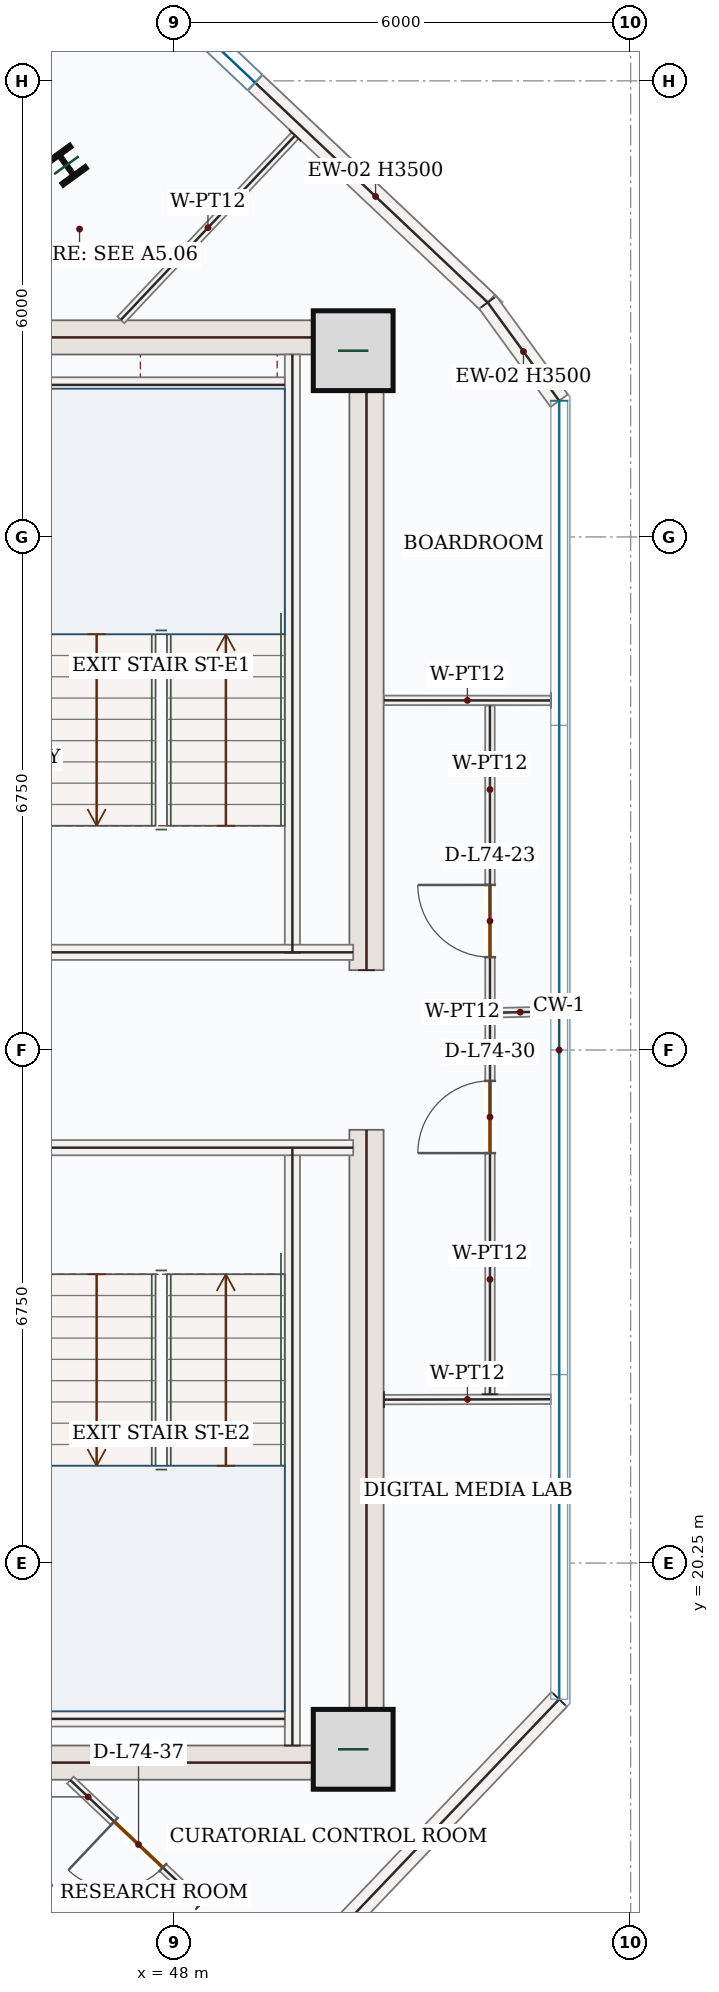
"""IFC4 building model, lengths in metres.
Left out: names, types, materials, properties, quantities, classifications, styles, units other than length and angle.
Written with IfcOpenShell. Run it as: python <this file> out.ifc"""

import sys

from ifc_helpers import new_model, si_unit, direction, frame, frame_2d, origin, origin_2d, place, context, subcontext, project, spatial, rectangle, i_section, extrude, source, transform, mapped, element, fill, save


model = new_model("IFC4")
c1 = context("Model", 3, precision=1e-05, world=origin(), true_north=direction((0.0, 1.0)))
c2 = subcontext(c1, "Body", "Model", "MODEL_VIEW")
j1 = project(units=[si_unit("LENGTHUNIT", "METRE"), si_unit("PLANEANGLEUNIT", "RADIAN")], contexts=[c1])
p1 = place(None, origin())
s1 = spatial("IfcSite", under=j1, at=p1, CompositionType="ELEMENT")
p2 = place(p1, origin())
s2 = spatial("IfcBuilding", under=s1, at=p2, CompositionType="ELEMENT")
p3 = place(p2, frame((0.0, 0.0, 306.6)))
s3 = spatial("IfcBuildingStorey", under=s2, at=p3, CompositionType="ELEMENT", Elevation=306.6)
m1 = source(origin(), c2, "Body", "SweptSolid", [
    extrude(rectangle(XDim=8.55, YDim=0.45, at=frame_2d((4.275, 0.0))), origin(), (0.0, 0.0, 1.0), 3.5),
])
for number, where, z_axis, x_axis in (
    (1, (50.525, 17.4, 0.0), (0.0, 0.0, 1.0), (0.0, 1.0, 0.0)),
    (2, (50.525, 28.05, 0.0), (0.0, 0.0, 1.0), (0.0, 1.0, 0.0)),
):
    element("IfcWall", number, at=place(p3, frame(where, z_axis=z_axis, x_axis=x_axis)), inside=s3, PredefinedType="SHEAR", context=c2, shape_type="MappedRepresentation", body=[
        mapped(m1, transform((0.0, 0.0, 0.0), x_axis=(1.0, 0.0, 0.0), y_axis=(0.0, 1.0, 0.0), z_axis=(0.0, 0.0, 1.0), scale=1.0)),
    ])
m2 = source(origin(), c2, "Body", "SweptSolid", [
    extrude(rectangle(XDim=7.1, YDim=0.45, at=frame_2d((3.55, 0.0))), origin(), (0.0, 0.0, 1.0), 3.5),
])
for number, where, z_axis, x_axis in (
    (3, (43.2, 17.625, 0.0), (0.0, 0.0, 1.0), (1.0, 0.0, 0.0)),
    (4, (43.2, 36.375, 0.0), (0.0, 0.0, 1.0), (1.0, 0.0, 0.0)),
):
    element("IfcWall", number, at=place(p3, frame(where, z_axis=z_axis, x_axis=x_axis)), inside=s3, PredefinedType="SHEAR", context=c2, shape_type="MappedRepresentation", body=[
        mapped(m2, transform((0.0, 0.0, 0.0), x_axis=(1.0, 0.0, 0.0), y_axis=(0.0, 1.0, 0.0), z_axis=(0.0, 0.0, 1.0), scale=1.0)),
    ])
m3 = source(origin(), c2, "Body", "SweptSolid", [
    extrude(rectangle(XDim=1.05, YDim=1.05, at=origin_2d()), origin(), (0.0, 0.0, 1.0), 3.75),
])
for number, where, z_axis, x_axis in (
    (5, (50.35, 17.8, 0.0), (0.0, 0.0, 1.0), (1.0, 0.0, 0.0)),
    (6, (50.35, 36.2, 0.0), (0.0, 0.0, 1.0), (1.0, 0.0, 0.0)),
):
    element("IfcColumn", number, at=place(p3, frame(where, z_axis=z_axis, x_axis=x_axis)), inside=s3, PredefinedType="COLUMN", context=c2, shape_type="MappedRepresentation", body=[
        mapped(m3, transform((0.0, 0.0, 0.0), x_axis=(1.0, 0.0, 0.0), y_axis=(0.0, 1.0, 0.0), z_axis=(0.0, 0.0, 1.0), scale=1.0)),
    ])
m4 = source(origin(), c2, "Body", "SweptSolid", [
    extrude(i_section(OverallWidth=0.374, OverallDepth=0.372, WebThickness=0.016, FlangeThickness=0.026, FilletRadius=0.018, at=origin_2d()), origin(), (0.0, 0.0, 1.0), 3.75),
])
p4 = place(p3, frame((46.578, 38.641, 0.0), z_axis=(0.0, 0.0, 1.0), x_axis=(0.809016994375, 0.587785252292, 0.0)))
e7 = element("IfcColumn", 7, at=p4, inside=s3, PredefinedType="COLUMN", context=c2, shape_type="MappedRepresentation", body=[
    mapped(m4, transform((0.0, 0.0, 0.0), x_axis=(1.0, 0.0, 0.0), y_axis=(0.0, 1.0, 0.0), z_axis=(0.0, 0.0, 1.0), scale=1.0)),
])
p5 = place(p3, frame((44.91, 43.649, 0.0), z_axis=(0.0, 0.0, 1.0), x_axis=(0.726772856404, -0.686877875022, 0.0)))
e8 = element("IfcWall", 8, at=p5, inside=s3, PredefinedType="SOLIDWALL", context=c2, shape_type="SweptSolid", body=[
    extrude(rectangle(XDim=9.92, YDim=0.28, at=frame_2d((4.96, 0.0))), origin(), (0.0, 0.0, 1.0), 3.5),
])
p6 = place(p5, frame((4.21, 0.0, 0.85)))
e9 = element("IfcOpeningElement", 9, at=p6, cuts=e8, PredefinedType="OPENING", context=c2, shape_type="SweptSolid", body=[
    extrude(rectangle(XDim=1.5, YDim=1.5, at=frame_2d((0.75, 0.75))), frame((0.0, 0.15, 0.0), z_axis=(0.0, -1.0, 0.0), x_axis=(1.0, 0.0, 0.0)), (0.0, 0.0, 1.0), 0.3),
])
m5 = source(origin(), c2, "Body", "SweptSolid", [
    extrude(rectangle(XDim=1.599, YDim=0.28, at=frame_2d((0.799, 0.0))), origin(), (0.0, 0.0, 1.0), 3.5),
])
p7 = place(p3, frame((52.12, 36.835, 0.0), z_axis=(0.0, 0.0, 1.0), x_axis=(0.58820801539, -0.808709670173, 0.0)))
e10 = element("IfcWall", 10, at=p7, inside=s3, PredefinedType="SOLIDWALL", context=c2, shape_type="MappedRepresentation", body=[
    mapped(m5, transform((0.0, 0.0, 0.0), x_axis=(1.0, 0.0, 0.0), y_axis=(0.0, 1.0, 0.0), z_axis=(0.0, 0.0, 1.0), scale=1.0)),
])
m6 = source(origin(), c2, "Body", "SweptSolid", [
    extrude(rectangle(XDim=10.47, YDim=0.28, at=frame_2d((5.235, 0.0))), origin(), (0.0, 0.0, 1.0), 3.5),
])
p8 = place(p3, frame((53.06, 18.458, 0.0), z_axis=(0.0, 0.0, 1.0), x_axis=(-0.690070788875, -0.723741878256, 0.0)))
e11 = element("IfcWall", 11, at=p8, inside=s3, PredefinedType="SOLIDWALL", context=c2, shape_type="MappedRepresentation", body=[
    mapped(m6, transform((0.0, 0.0, 0.0), x_axis=(1.0, 0.0, 0.0), y_axis=(0.0, 1.0, 0.0), z_axis=(0.0, 0.0, 1.0), scale=1.0)),
])
m7 = source(origin(), c2, "Body", "SweptSolid", [
    extrude(rectangle(XDim=7.87, YDim=0.2, at=frame_2d((3.935, 0.0))), origin(), (0.0, 0.0, 1.0), 3.5),
])
for number, where, z_axis, x_axis in (
    (12, (49.55, 17.85, 0.0), (0.0, 0.0, 1.0), (0.0, 1.0, 0.0)),
    (13, (49.55, 28.28, 0.0), (0.0, 0.0, 1.0), (0.0, 1.0, 0.0)),
):
    element("IfcWall", number, at=place(p3, frame(where, z_axis=z_axis, x_axis=x_axis)), inside=s3, PredefinedType="SOLIDWALL", context=c2, shape_type="MappedRepresentation", body=[
        mapped(m7, transform((0.0, 0.0, 0.0), x_axis=(1.0, 0.0, 0.0), y_axis=(0.0, 1.0, 0.0), z_axis=(0.0, 0.0, 1.0), scale=1.0)),
    ])
m8 = source(origin(), c2, "Body", "SweptSolid", [
    extrude(rectangle(XDim=4.25, YDim=0.2, at=frame_2d((2.125, 0.0))), origin(), (0.0, 0.0, 1.0), 3.5),
])
for number, where, z_axis, x_axis in (
    (14, (46.1, 25.715, 0.0), (0.0, 0.0, 1.0), (1.0, 0.0, 0.0)),
    (15, (46.1, 28.285, 0.0), (0.0, 0.0, 1.0), (1.0, 0.0, 0.0)),
):
    element("IfcWall", number, at=place(p3, frame(where, z_axis=z_axis, x_axis=x_axis)), inside=s3, PredefinedType="SOLIDWALL", context=c2, shape_type="MappedRepresentation", body=[
        mapped(m8, transform((0.0, 0.0, 0.0), x_axis=(1.0, 0.0, 0.0), y_axis=(0.0, 1.0, 0.0), z_axis=(0.0, 0.0, 1.0), scale=1.0)),
    ])
m9 = source(origin(), c2, "Body", "SweptSolid", [
    extrude(rectangle(XDim=3.25, YDim=0.2, at=frame_2d((1.625, 0.0))), origin(), (0.0, 0.0, 1.0), 3.5),
])
for number, where, z_axis, x_axis in (
    (16, (46.2, 35.75, 0.0), (0.0, 0.0, 1.0), (1.0, 0.0, 0.0)),
    (17, (46.2, 18.2, 0.0), (0.0, 0.0, 1.0), (1.0, 0.0, 0.0)),
):
    element("IfcWall", number, at=place(p3, frame(where, z_axis=z_axis, x_axis=x_axis)), inside=s3, PredefinedType="SOLIDWALL", context=c2, shape_type="MappedRepresentation", body=[
        mapped(m9, transform((0.0, 0.0, 0.0), x_axis=(1.0, 0.0, 0.0), y_axis=(0.0, 1.0, 0.0), z_axis=(0.0, 0.0, 1.0), scale=1.0)),
    ])
p9 = place(p3, frame((48.349, 15.769, 0.0), z_axis=(0.0, 0.0, 1.0), x_axis=(-0.726735597886, 0.686917295433, 0.0)))
e18 = element("IfcWall", 18, at=p9, inside=s3, PredefinedType="PARTITIONING", context=c2, shape_type="SweptSolid", body=[
    extrude(rectangle(XDim=2.367, YDim=0.125, at=frame_2d((1.183, 0.0))), origin(), (0.0, 0.0, 1.0), 3.5),
])
p10 = place(p9, frame((0.692, 0.0, 0.0)))
e19 = element("IfcOpeningElement", 19, at=p10, cuts=e18, PredefinedType="OPENING", context=c2, shape_type="SweptSolid", body=[
    extrude(rectangle(XDim=0.88, YDim=2.1, at=frame_2d((0.44, 1.05))), frame((0.0, 0.073, 0.0), z_axis=(0.0, -1.0, 0.0), x_axis=(1.0, 0.0, 0.0)), (0.0, 0.0, 1.0), 0.145),
])
p11 = place(p3, frame((47.544, 12.883, 0.0), z_axis=(0.0, 0.0, 1.0), x_axis=(-0.726761082497, 0.686890332562, 0.0)))
e20 = element("IfcWall", 20, at=p11, inside=s3, PredefinedType="PARTITIONING", context=c2, shape_type="SweptSolid", body=[
    extrude(rectangle(XDim=5.964, YDim=0.125, at=frame_2d((2.982, 0.0))), origin(), (0.0, 0.0, 1.0), 3.5),
])
p12 = place(p11, frame((1.103, 0.0, 0.0)))
e21 = element("IfcOpeningElement", 21, at=p12, cuts=e20, PredefinedType="OPENING", context=c2, shape_type="SweptSolid", body=[
    extrude(rectangle(XDim=0.95, YDim=2.15, at=frame_2d((0.475, 1.075))), frame((0.0, 0.073, 0.0), z_axis=(0.0, -1.0, 0.0), x_axis=(1.0, 0.0, 0.0)), (0.0, 0.0, 1.0), 0.145),
])
m10 = source(origin(), c2, "Body", "SweptSolid", [
    extrude(rectangle(XDim=2.195, YDim=0.125, at=frame_2d((1.098, 0.0))), origin(), (0.0, 0.0, 1.0), 3.5),
])
p13 = place(p3, frame((50.755, 22.4, 0.0), z_axis=(0.0, 0.0, 1.0), x_axis=(0.999997006375, 0.002446884011, 0.0)))
e22 = element("IfcWall", 22, at=p13, inside=s3, PredefinedType="PARTITIONING", context=c2, shape_type="MappedRepresentation", body=[
    mapped(m10, transform((0.0, 0.0, 0.0), x_axis=(1.0, 0.0, 0.0), y_axis=(0.0, 1.0, 0.0), z_axis=(0.0, 0.0, 1.0), scale=1.0)),
])
p14 = place(p3, frame((52.149, 22.471, 0.0), z_axis=(0.0, 0.0, 1.0), x_axis=(9.7318865e-05, 0.999999995265, 0.0)))
e23 = element("IfcWall", 23, at=p14, inside=s3, PredefinedType="PARTITIONING", context=c2, shape_type="SweptSolid", body=[
    extrude(rectangle(XDim=5.017, YDim=0.125, at=frame_2d((2.509, 0.0))), origin(), (0.0, 0.0, 1.0), 3.5),
])
p15 = place(p14, frame((3.173, 0.0, 0.0)))
e24 = element("IfcOpeningElement", 24, at=p15, cuts=e23, PredefinedType="OPENING", context=c2, shape_type="SweptSolid", body=[
    extrude(rectangle(XDim=0.95, YDim=2.15, at=frame_2d((0.475, 1.075))), frame((0.0, 0.073, 0.0), z_axis=(0.0, -1.0, 0.0), x_axis=(1.0, 0.0, 0.0)), (0.0, 0.0, 1.0), 0.145),
])
m11 = source(origin(), c2, "Body", "SweptSolid", [
    extrude(rectangle(XDim=0.795, YDim=0.125, at=frame_2d((0.398, 0.0))), origin(), (0.0, 0.0, 1.0), 3.5),
])
p16 = place(p3, frame((52.15, 27.488, 0.0), z_axis=(0.0, 0.0, 1.0), x_axis=(0.999727865024, 0.023328006675, 0.0)))
e25 = element("IfcWall", 25, at=p16, inside=s3, PredefinedType="PARTITIONING", context=c2, shape_type="MappedRepresentation", body=[
    mapped(m11, transform((0.0, 0.0, 0.0), x_axis=(1.0, 0.0, 0.0), y_axis=(0.0, 1.0, 0.0), z_axis=(0.0, 0.0, 1.0), scale=1.0)),
])
m12 = source(origin(), c2, "Body", "SweptSolid", [
    extrude(rectangle(XDim=3.337, YDim=0.125, at=frame_2d((1.669, 0.0))), origin(), (0.0, 0.0, 1.0), 3.5),
])
p17 = place(p3, frame((49.585, 39.031, 0.0), z_axis=(0.0, 0.0, 1.0), x_axis=(-0.686891986515, -0.726759519278, 0.0)))
e26 = element("IfcWall", 26, at=p17, inside=s3, PredefinedType="PARTITIONING", context=c2, shape_type="MappedRepresentation", body=[
    mapped(m12, transform((0.0, 0.0, 0.0), x_axis=(1.0, 0.0, 0.0), y_axis=(0.0, 1.0, 0.0), z_axis=(0.0, 0.0, 1.0), scale=1.0)),
])
p18 = place(p3, frame((42.672, 37.306, 0.0), z_axis=(0.0, 0.0, 1.0), x_axis=(0.686871949206, 0.726778456886, 0.0)))
e27 = element("IfcWall", 27, at=p18, inside=s3, PredefinedType="PARTITIONING", context=c2, shape_type="SweptSolid", body=[
    extrude(rectangle(XDim=6.001, YDim=0.125, at=frame_2d((3.001, 0.0))), origin(), (0.0, 0.0, 1.0), 3.5),
])
p19 = place(p18, frame((1.768, 0.0, 0.0)))
e28 = element("IfcOpeningElement", 28, at=p19, cuts=e27, PredefinedType="OPENING", context=c2, shape_type="SweptSolid", body=[
    extrude(rectangle(XDim=0.95, YDim=2.15, at=frame_2d((0.475, 1.075))), frame((0.0, 0.073, 0.0), z_axis=(0.0, -1.0, 0.0), x_axis=(1.0, 0.0, 0.0)), (0.0, 0.0, 1.0), 0.145),
])
p20 = place(p3, frame((52.95, 31.598, 0.0), z_axis=(0.0, 0.0, 1.0), x_axis=(-0.999999696925, 0.000778556098, 0.0)))
e29 = element("IfcWall", 29, at=p20, inside=s3, PredefinedType="PARTITIONING", context=c2, shape_type="MappedRepresentation", body=[
    mapped(m10, transform((0.0, 0.0, 0.0), x_axis=(1.0, 0.0, 0.0), y_axis=(0.0, 1.0, 0.0), z_axis=(0.0, 0.0, 1.0), scale=1.0)),
])
p21 = place(p3, frame((52.15, 27.556, 0.0), z_axis=(0.0, 0.0, 1.0), x_axis=(-0.000245639885, 0.999999969831, 0.0)))
e30 = element("IfcWall", 30, at=p21, inside=s3, PredefinedType="PARTITIONING", context=c2, shape_type="SweptSolid", body=[
    extrude(rectangle(XDim=3.976, YDim=0.125, at=frame_2d((1.988, 0.0))), origin(), (0.0, 0.0, 1.0), 3.5),
])
p22 = place(p21, frame((0.666, 0.0, 0.0)))
e31 = element("IfcOpeningElement", 31, at=p22, cuts=e30, PredefinedType="OPENING", context=c2, shape_type="SweptSolid", body=[
    extrude(rectangle(XDim=0.95, YDim=2.15, at=frame_2d((0.475, 1.075))), frame((0.0, 0.073, 0.0), z_axis=(0.0, -1.0, 0.0), x_axis=(1.0, 0.0, 0.0)), (0.0, 0.0, 1.0), 0.145),
])
m13 = source(origin(), c2, "Body", "SweptSolid", [
    extrude(rectangle(XDim=1.5, YDim=1.5, at=frame_2d((0.75, 0.75))), frame((0.0, 0.03, 0.0), z_axis=(0.0, -1.0, 0.0), x_axis=(1.0, 0.0, 0.0)), (0.0, 0.0, 1.0), 0.06),
])
p23 = place(p6, origin())
e32 = element("IfcWindow", 32, at=p23, inside=s3, PartitioningType="SINGLE_PANEL", PredefinedType="WINDOW", context=c2, shape_type="MappedRepresentation", body=[
    mapped(m13, transform((0.0, 0.0, 0.0), x_axis=(1.0, 0.0, 0.0), y_axis=(0.0, 1.0, 0.0), z_axis=(0.0, 0.0, 1.0), scale=1.0)),
])
fill(e9, e32)
m14 = source(origin(), c2, "Body", "SweptSolid", [
    extrude(rectangle(XDim=0.95, YDim=2.15, at=frame_2d((0.475, 1.075))), frame((0.0, 0.025, 0.0), z_axis=(0.0, -1.0, 0.0), x_axis=(1.0, 0.0, 0.0)), (0.0, 0.0, 1.0), 0.05),
])
p24 = place(p22, origin())
e33 = element("IfcDoor", 33, at=p24, inside=s3, OperationType="SINGLE_SWING_RIGHT", PredefinedType="DOOR", context=c2, shape_type="MappedRepresentation", body=[
    mapped(m14, transform((0.0, 0.0, 0.0), x_axis=(1.0, 0.0, 0.0), y_axis=(0.0, 1.0, 0.0), z_axis=(0.0, 0.0, 1.0), scale=1.0)),
])
fill(e31, e33)
p25 = place(p15, origin())
e34 = element("IfcDoor", 34, at=p25, inside=s3, OperationType="SINGLE_SWING_LEFT", PredefinedType="DOOR", context=c2, shape_type="MappedRepresentation", body=[
    mapped(m14, transform((0.0, 0.0, 0.0), x_axis=(1.0, 0.0, 0.0), y_axis=(0.0, 1.0, 0.0), z_axis=(0.0, 0.0, 1.0), scale=1.0)),
])
fill(e24, e34)
m15 = source(origin(), c2, "Body", "SweptSolid", [
    extrude(rectangle(XDim=0.88, YDim=2.1, at=frame_2d((0.44, 1.05))), frame((0.0, 0.025, 0.0), z_axis=(0.0, -1.0, 0.0), x_axis=(1.0, 0.0, 0.0)), (0.0, 0.0, 1.0), 0.05),
])
p26 = place(p10, origin())
e35 = element("IfcDoor", 35, at=p26, inside=s3, OperationType="SINGLE_SWING_RIGHT", PredefinedType="DOOR", context=c2, shape_type="MappedRepresentation", body=[
    mapped(m15, transform((0.0, 0.0, 0.0), x_axis=(1.0, 0.0, 0.0), y_axis=(0.0, 1.0, 0.0), z_axis=(0.0, 0.0, 1.0), scale=1.0)),
])
fill(e19, e35)
save(model, sys.argv[1])
